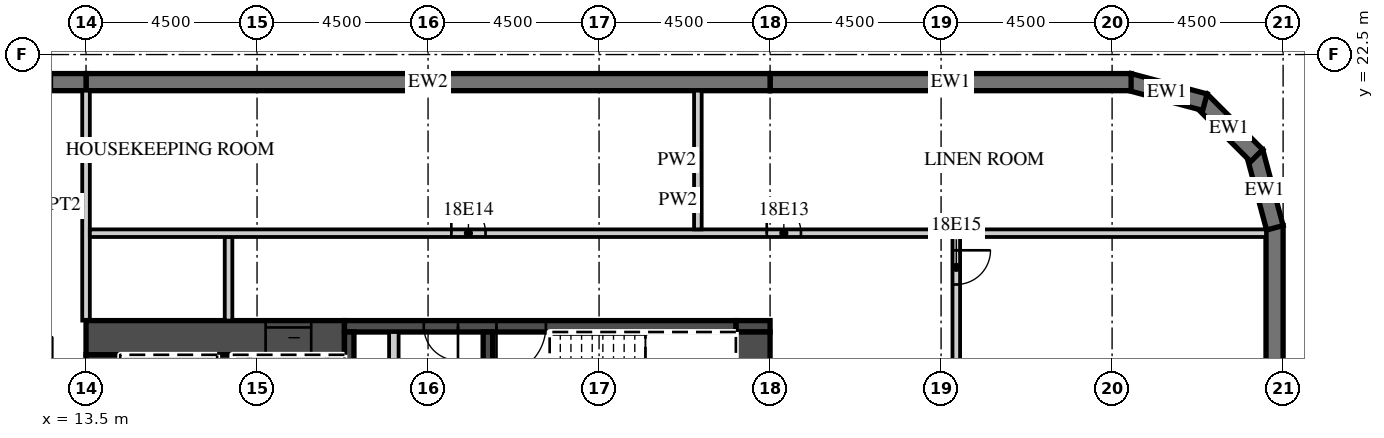
"""IFC4 building model, lengths in metres.
Left out: names, types, materials, properties, quantities, classifications, styles, units other than length and angle.
Written with IfcOpenShell. Run it as: python <this file> out.ifc"""

import sys

from ifc_helpers import new_model, si_unit, direction, frame, frame_2d, origin, place, context, subcontext, project, spatial, polyline, rectangle, outline, extrude, element, fill, save


model = new_model("IFC4")
c1 = context("Model", 3, precision=1e-05, world=origin(), true_north=direction((0.0, 1.0)))
c2 = subcontext(c1, "Body", "Model", "MODEL_VIEW")
j1 = project(units=[si_unit("LENGTHUNIT", "METRE"), si_unit("PLANEANGLEUNIT", "RADIAN")], contexts=[c1])
p1 = place(None, origin())
s1 = spatial("IfcSite", under=j1, at=p1, CompositionType="ELEMENT")
p2 = place(p1, origin())
s2 = spatial("IfcBuilding", under=s1, at=p2, CompositionType="ELEMENT")
p3 = place(p2, frame((0.0, 0.0, 89.7)))
s3 = spatial("IfcBuildingStorey", under=s2, at=p3, CompositionType="ELEMENT", Elevation=89.7)
p4 = place(p3, frame((44.775, -18.0, 0.0), z_axis=(0.0, 0.0, 1.0), x_axis=(0.0, 1.0, 0.0)))
e1 = element("IfcWall", 1, at=p4, inside=s3, PredefinedType="SOLIDWALL", context=c2, shape_type="SweptSolid", body=[
    extrude(rectangle(XDim=36.0, YDim=0.45, at=frame_2d((18.0, 0.0))), origin(), (0.0, 0.0, 1.0), 3.02),
])
p5 = place(p4, frame((3.9, 0.0, 0.45)))
e2 = element("IfcOpeningElement", 2, at=p5, cuts=e1, PredefinedType="OPENING", context=c2, shape_type="SweptSolid", body=[
    extrude(rectangle(XDim=3.3, YDim=2.25, at=frame_2d((1.65, 1.125))), frame((0.0, 0.235, 0.0), z_axis=(0.0, -1.0, 0.0), x_axis=(1.0, 0.0, 0.0)), (0.0, 0.0, 1.0), 0.47),
])
p6 = place(p4, frame((8.4, 0.0, 0.45)))
e3 = element("IfcOpeningElement", 3, at=p6, cuts=e1, PredefinedType="OPENING", context=c2, shape_type="SweptSolid", body=[
    extrude(rectangle(XDim=3.3, YDim=2.25, at=frame_2d((1.65, 1.125))), frame((0.0, 0.235, 0.0), z_axis=(0.0, -1.0, 0.0), x_axis=(1.0, 0.0, 0.0)), (0.0, 0.0, 1.0), 0.47),
])
p7 = place(p4, frame((12.9, 0.0, 0.45)))
e4 = element("IfcOpeningElement", 4, at=p7, cuts=e1, PredefinedType="OPENING", context=c2, shape_type="SweptSolid", body=[
    extrude(rectangle(XDim=3.3, YDim=2.25, at=frame_2d((1.65, 1.125))), frame((0.0, 0.235, 0.0), z_axis=(0.0, -1.0, 0.0), x_axis=(1.0, 0.0, 0.0)), (0.0, 0.0, 1.0), 0.47),
])
p8 = place(p3, frame((44.783, 17.942, 0.0), z_axis=(0.0, 0.0, 1.0), x_axis=(-0.25881466832, 0.965926999034, 0.0)))
e5 = element("IfcWall", 5, at=p8, inside=s3, PredefinedType="SOLIDWALL", context=c2, shape_type="SweptSolid", body=[
    extrude(outline(polyline([(0.0, -0.225), (2.071, -0.225), (1.95, 0.225), (0.121, 0.225), (0.0, -0.225)])), origin(), (0.0, 0.0, 1.0), 3.02),
])
p9 = place(p3, frame((44.305, 19.841, 0.0), z_axis=(0.0, 0.0, 1.0), x_axis=(-0.707106781187, 0.707106781187, 0.0)))
e6 = element("IfcWall", 6, at=p9, inside=s3, PredefinedType="SOLIDWALL", context=c2, shape_type="SweptSolid", body=[
    extrude(outline(polyline([(0.0, -0.225), (2.071, -0.225), (1.95, 0.225), (0.121, 0.225), (0.0, -0.225)])), origin(), (0.0, 0.0, 1.0), 3.02),
])
p10 = place(p3, frame((42.942, 21.247, 0.0), z_axis=(0.0, 0.0, 1.0), x_axis=(-0.965926999034, 0.25881466832, 0.0)))
e7 = element("IfcWall", 7, at=p10, inside=s3, PredefinedType="SOLIDWALL", context=c2, shape_type="SweptSolid", body=[
    extrude(outline(polyline([(-0.0, -0.225), (2.07, -0.225), (1.95, 0.225), (0.12, 0.225), (-0.0, -0.225)])), origin(), (0.0, 0.0, 1.0), 3.02),
])
p11 = place(p3, frame((41.0, 21.775, 0.0), z_axis=(0.0, 0.0, 1.0), x_axis=(-1.0, 0.0, 0.0)))
e8 = element("IfcWall", 8, at=p11, inside=s3, PredefinedType="SOLIDWALL", context=c2, shape_type="SweptSolid", body=[
    extrude(rectangle(XDim=9.5, YDim=0.45, at=frame_2d((4.75, 0.0))), origin(), (0.0, 0.0, 1.0), 3.02),
])
p12 = place(p3, frame((31.5, 21.775, 0.0), z_axis=(0.0, 0.0, 1.0), x_axis=(-1.0, 0.0, 0.0)))
e9 = element("IfcWall", 9, at=p12, inside=s3, PredefinedType="SOLIDWALL", context=c2, shape_type="SweptSolid", body=[
    extrude(rectangle(XDim=18.0, YDim=0.45, at=frame_2d((9.0, 0.0))), origin(), (0.0, 0.0, 1.0), 3.02),
])
p13 = place(p3, frame((13.5, 21.775, 0.0), z_axis=(0.0, 0.0, 1.0), x_axis=(-1.0, 0.0, 0.0)))
e10 = element("IfcWall", 10, at=p13, inside=s3, PredefinedType="SOLIDWALL", context=c2, shape_type="SweptSolid", body=[
    extrude(rectangle(XDim=54.5, YDim=0.45, at=frame_2d((27.25, 0.0))), origin(), (0.0, 0.0, 1.0), 3.02),
])
p14 = place(p13, frame((0.9, 0.0, 0.45)))
e11 = element("IfcOpeningElement", 11, at=p14, cuts=e10, PredefinedType="OPENING", context=c2, shape_type="SweptSolid", body=[
    extrude(rectangle(XDim=2.7, YDim=2.25, at=frame_2d((1.35, 1.125))), frame((0.0, 0.235, 0.0), z_axis=(0.0, -1.0, 0.0), x_axis=(1.0, 0.0, 0.0)), (0.0, 0.0, 1.0), 0.47),
])
p15 = place(p13, frame((5.4, 0.0, 0.45)))
e12 = element("IfcOpeningElement", 12, at=p15, cuts=e10, PredefinedType="OPENING", context=c2, shape_type="SweptSolid", body=[
    extrude(rectangle(XDim=2.7, YDim=2.25, at=frame_2d((1.35, 1.125))), frame((0.0, 0.235, 0.0), z_axis=(0.0, -1.0, 0.0), x_axis=(1.0, 0.0, 0.0)), (0.0, 0.0, 1.0), 0.47),
])
p16 = place(p13, frame((9.9, 0.0, 0.45)))
e13 = element("IfcOpeningElement", 13, at=p16, cuts=e10, PredefinedType="OPENING", context=c2, shape_type="SweptSolid", body=[
    extrude(rectangle(XDim=2.7, YDim=2.25, at=frame_2d((1.35, 1.125))), frame((0.0, 0.235, 0.0), z_axis=(0.0, -1.0, 0.0), x_axis=(1.0, 0.0, 0.0)), (0.0, 0.0, 1.0), 0.47),
])
p17 = place(p13, frame((14.4, 0.0, 0.45)))
e14 = element("IfcOpeningElement", 14, at=p17, cuts=e10, PredefinedType="OPENING", context=c2, shape_type="SweptSolid", body=[
    extrude(rectangle(XDim=2.7, YDim=2.25, at=frame_2d((1.35, 1.125))), frame((0.0, 0.235, 0.0), z_axis=(0.0, -1.0, 0.0), x_axis=(1.0, 0.0, 0.0)), (0.0, 0.0, 1.0), 0.47),
])
p18 = place(p13, frame((18.9, 0.0, 0.45)))
e15 = element("IfcOpeningElement", 15, at=p18, cuts=e10, PredefinedType="OPENING", context=c2, shape_type="SweptSolid", body=[
    extrude(rectangle(XDim=2.7, YDim=2.25, at=frame_2d((1.35, 1.125))), frame((0.0, 0.235, 0.0), z_axis=(0.0, -1.0, 0.0), x_axis=(1.0, 0.0, 0.0)), (0.0, 0.0, 1.0), 0.47),
])
p19 = place(p13, frame((23.4, 0.0, 0.45)))
e16 = element("IfcOpeningElement", 16, at=p19, cuts=e10, PredefinedType="OPENING", context=c2, shape_type="SweptSolid", body=[
    extrude(rectangle(XDim=2.7, YDim=2.25, at=frame_2d((1.35, 1.125))), frame((0.0, 0.235, 0.0), z_axis=(0.0, -1.0, 0.0), x_axis=(1.0, 0.0, 0.0)), (0.0, 0.0, 1.0), 0.47),
])
p20 = place(p13, frame((27.9, 0.0, 0.45)))
e17 = element("IfcOpeningElement", 17, at=p20, cuts=e10, PredefinedType="OPENING", context=c2, shape_type="SweptSolid", body=[
    extrude(rectangle(XDim=2.7, YDim=2.25, at=frame_2d((1.35, 1.125))), frame((0.0, 0.235, 0.0), z_axis=(0.0, -1.0, 0.0), x_axis=(1.0, 0.0, 0.0)), (0.0, 0.0, 1.0), 0.47),
])
p21 = place(p13, frame((32.4, 0.0, 0.45)))
e18 = element("IfcOpeningElement", 18, at=p21, cuts=e10, PredefinedType="OPENING", context=c2, shape_type="SweptSolid", body=[
    extrude(rectangle(XDim=2.7, YDim=2.25, at=frame_2d((1.35, 1.125))), frame((0.0, 0.235, 0.0), z_axis=(0.0, -1.0, 0.0), x_axis=(1.0, 0.0, 0.0)), (0.0, 0.0, 1.0), 0.47),
])
p22 = place(p13, frame((36.9, 0.0, 0.45)))
e19 = element("IfcOpeningElement", 19, at=p22, cuts=e10, PredefinedType="OPENING", context=c2, shape_type="SweptSolid", body=[
    extrude(rectangle(XDim=2.7, YDim=2.25, at=frame_2d((1.35, 1.125))), frame((0.0, 0.235, 0.0), z_axis=(0.0, -1.0, 0.0), x_axis=(1.0, 0.0, 0.0)), (0.0, 0.0, 1.0), 0.47),
])
p23 = place(p13, frame((41.4, 0.0, 0.45)))
e20 = element("IfcOpeningElement", 20, at=p23, cuts=e10, PredefinedType="OPENING", context=c2, shape_type="SweptSolid", body=[
    extrude(rectangle(XDim=2.7, YDim=2.25, at=frame_2d((1.35, 1.125))), frame((0.0, 0.235, 0.0), z_axis=(0.0, -1.0, 0.0), x_axis=(1.0, 0.0, 0.0)), (0.0, 0.0, 1.0), 0.47),
])
p24 = place(p13, frame((45.9, 0.0, 0.45)))
e21 = element("IfcOpeningElement", 21, at=p24, cuts=e10, PredefinedType="OPENING", context=c2, shape_type="SweptSolid", body=[
    extrude(rectangle(XDim=2.7, YDim=2.25, at=frame_2d((1.35, 1.125))), frame((0.0, 0.235, 0.0), z_axis=(0.0, -1.0, 0.0), x_axis=(1.0, 0.0, 0.0)), (0.0, 0.0, 1.0), 0.47),
])
p25 = place(p13, frame((50.4, 0.0, 0.45)))
e22 = element("IfcOpeningElement", 22, at=p25, cuts=e10, PredefinedType="OPENING", context=c2, shape_type="SweptSolid", body=[
    extrude(rectangle(XDim=2.7, YDim=2.25, at=frame_2d((1.35, 1.125))), frame((0.0, 0.235, 0.0), z_axis=(0.0, -1.0, 0.0), x_axis=(1.0, 0.0, 0.0)), (0.0, 0.0, 1.0), 0.47),
])
p26 = place(p3, frame((13.5, 15.5, 0.0), z_axis=(0.0, 0.0, 1.0), x_axis=(0.0, 1.0, 0.0)))
e23 = element("IfcWall", 23, at=p26, inside=s3, PredefinedType="PARTITIONING", context=c2, shape_type="SweptSolid", body=[
    extrude(rectangle(XDim=6.05, YDim=0.2, at=frame_2d((3.025, 0.0))), origin(), (0.0, 0.0, 1.0), 3.02),
])
p27 = place(p3, frame((13.5, 15.05, 0.0), z_axis=(0.0, 0.0, 1.0), x_axis=(1.0, 0.0, 0.0)))
e24 = element("IfcWall", 24, at=p27, inside=s3, PredefinedType="SHEAR", context=c2, shape_type="SweptSolid", body=[
    extrude(rectangle(XDim=6.8, YDim=0.9, at=frame_2d((3.4, 0.0))), origin(), (0.0, 0.0, 1.0), 3.02),
])
p28 = place(p27, frame((4.725, 0.0, 0.0)))
e25 = element("IfcOpeningElement", 25, at=p28, cuts=e24, PredefinedType="OPENING", context=c2, shape_type="SweptSolid", body=[
    extrude(rectangle(XDim=1.2, YDim=2.1, at=frame_2d((0.6, 1.05))), frame((0.0, 0.46, 0.0), z_axis=(0.0, -1.0, 0.0), x_axis=(1.0, 0.0, 0.0)), (0.0, 0.0, 1.0), 0.92),
])
p29 = place(p3, frame((30.6, 15.35, 0.0), z_axis=(0.0, 0.0, 1.0), x_axis=(1.0, 0.0, 0.0)))
e26 = element("IfcWall", 26, at=p29, inside=s3, PredefinedType="SHEAR", context=c2, shape_type="SweptSolid", body=[
    extrude(rectangle(XDim=0.9, YDim=0.3, at=frame_2d((0.45, 0.0))), origin(), (0.0, 0.0, 1.0), 3.02),
])
p30 = place(p3, frame((20.3, 15.35, 0.0), z_axis=(0.0, 0.0, 1.0), x_axis=(1.0, 0.0, 0.0)))
e27 = element("IfcWall", 27, at=p30, inside=s3, PredefinedType="SHEAR", context=c2, shape_type="SweptSolid", body=[
    extrude(rectangle(XDim=10.3, YDim=0.3, at=frame_2d((5.15, 0.0))), origin(), (0.0, 0.0, 1.0), 3.02),
])
p31 = place(p30, frame((4.0, 0.0, 0.0)))
e28 = element("IfcOpeningElement", 28, at=p31, cuts=e27, PredefinedType="OPENING", context=c2, shape_type="SweptSolid", body=[
    extrude(rectangle(XDim=1.3, YDim=2.1, at=frame_2d((0.65, 1.05))), frame((0.0, 0.16, 0.0), z_axis=(0.0, -1.0, 0.0), x_axis=(1.0, 0.0, 0.0)), (0.0, 0.0, 1.0), 0.32),
])
p32 = place(p30, frame((2.087, 0.0, 0.0)))
e29 = element("IfcOpeningElement", 29, at=p32, cuts=e27, PredefinedType="OPENING", context=c2, shape_type="SweptSolid", body=[
    extrude(rectangle(XDim=0.9, YDim=2.1, at=frame_2d((0.45, 1.05))), frame((0.0, 0.16, 0.0), z_axis=(0.0, -1.0, 0.0), x_axis=(1.0, 0.0, 0.0)), (0.0, 0.0, 1.0), 0.32),
])
p33 = place(p3, frame((31.05, 2.4, 0.0), z_axis=(0.0, 0.0, 1.0), x_axis=(0.0, 1.0, 0.0)))
e30 = element("IfcWall", 30, at=p33, inside=s3, PredefinedType="SHEAR", context=c2, shape_type="SweptSolid", body=[
    extrude(rectangle(XDim=12.8, YDim=0.9, at=frame_2d((6.4, 0.0))), origin(), (0.0, 0.0, 1.0), 3.02),
])
p34 = place(p33, frame((0.2, 0.0, 0.0)))
e31 = element("IfcOpeningElement", 31, at=p34, cuts=e30, PredefinedType="OPENING", context=c2, shape_type="SweptSolid", body=[
    extrude(rectangle(XDim=1.1, YDim=2.1, at=frame_2d((0.55, 1.05))), frame((0.0, 0.46, 0.0), z_axis=(0.0, -1.0, 0.0), x_axis=(1.0, 0.0, 0.0)), (0.0, 0.0, 1.0), 0.92),
])
p35 = place(p3, frame((13.95, 2.4, 0.0), z_axis=(0.0, 0.0, 1.0), x_axis=(0.0, 1.0, 0.0)))
e32 = element("IfcWall", 32, at=p35, inside=s3, PredefinedType="SHEAR", context=c2, shape_type="SweptSolid", body=[
    extrude(rectangle(XDim=12.2, YDim=0.9, at=frame_2d((6.1, 0.0))), origin(), (0.0, 0.0, 1.0), 3.02),
])
p36 = place(p3, frame((17.15, 8.8, 0.0), z_axis=(0.0, 0.0, 1.0), x_axis=(0.0, 1.0, 0.0)))
e33 = element("IfcWall", 33, at=p36, inside=s3, PredefinedType="SHEAR", context=c2, shape_type="SweptSolid", body=[
    extrude(rectangle(XDim=5.8, YDim=0.4, at=frame_2d((2.9, 0.0))), origin(), (0.0, 0.0, 1.0), 3.02),
])
for number, where, z_axis, x_axis in (
    (34, (20.425, 11.95, 0.0), (0.0, 0.0, 1.0), (0.0, 1.0, 0.0)),
    (35, (24.075, 11.95, 0.0), (0.0, 0.0, 1.0), (0.0, 1.0, 0.0)),
):
    element("IfcWall", number, at=place(p3, frame(where, z_axis=z_axis, x_axis=x_axis)), inside=s3, PredefinedType="SHEAR", context=c2, shape_type="SweptSolid", body=[
        extrude(rectangle(XDim=3.25, YDim=0.25, at=frame_2d((1.625, 0.0))), origin(), (0.0, 0.0, 1.0), 3.02),
    ])
p37 = place(p3, frame((21.6, 11.95, 0.0), z_axis=(0.0, 0.0, 1.0), x_axis=(0.0, 1.0, 0.0)))
e36 = element("IfcWall", 36, at=p37, inside=s3, PredefinedType="PARTITIONING", context=c2, shape_type="SweptSolid", body=[
    extrude(rectangle(XDim=3.25, YDim=0.25, at=frame_2d((1.625, 0.0))), origin(), (0.0, 0.0, 1.0), 3.02),
])
p38 = place(p3, frame((17.25, 15.5, 0.0), z_axis=(0.0, 0.0, 1.0), x_axis=(0.0, 1.0, 0.0)))
e37 = element("IfcWall", 37, at=p38, inside=s3, PredefinedType="PARTITIONING", context=c2, shape_type="SweptSolid", body=[
    extrude(rectangle(XDim=2.2, YDim=0.2, at=frame_2d((1.1, 0.0))), origin(), (0.0, 0.0, 1.0), 3.02),
])
p39 = place(p3, frame((36.4, 1.75, 0.0), z_axis=(0.0, 0.0, 1.0), x_axis=(0.0, 1.0, 0.0)))
e38 = element("IfcWall", 38, at=p39, inside=s3, PredefinedType="PARTITIONING", context=c2, shape_type="SweptSolid", body=[
    extrude(rectangle(XDim=15.95, YDim=0.2, at=frame_2d((7.975, 0.0))), origin(), (0.0, 0.0, 1.0), 3.02),
])
p40 = place(p39, frame((14.7, 0.0, 0.0)))
e39 = element("IfcOpeningElement", 39, at=p40, cuts=e38, PredefinedType="OPENING", context=c2, shape_type="SweptSolid", body=[
    extrude(rectangle(XDim=0.9, YDim=2.1, at=frame_2d((0.45, 1.05))), frame((0.0, 0.11, 0.0), z_axis=(0.0, -1.0, 0.0), x_axis=(1.0, 0.0, 0.0)), (0.0, 0.0, 1.0), 0.22),
])
p41 = place(p3, frame((13.6, 17.8, 0.0), z_axis=(0.0, 0.0, 1.0), x_axis=(1.0, 0.0, 0.0)))
e40 = element("IfcWall", 40, at=p41, inside=s3, PredefinedType="PARTITIONING", context=c2, shape_type="SweptSolid", body=[
    extrude(rectangle(XDim=30.95, YDim=0.2, at=frame_2d((15.475, 0.0))), origin(), (0.0, 0.0, 1.0), 3.02),
])
p42 = place(p41, frame((17.812, 0.0, 0.0)))
e41 = element("IfcOpeningElement", 41, at=p42, cuts=e40, PredefinedType="OPENING", context=c2, shape_type="SweptSolid", body=[
    extrude(rectangle(XDim=0.9, YDim=2.1, at=frame_2d((0.45, 1.05))), frame((0.0, 0.11, 0.0), z_axis=(0.0, -1.0, 0.0), x_axis=(1.0, 0.0, 0.0)), (0.0, 0.0, 1.0), 0.22),
])
p43 = place(p41, frame((9.512, 0.0, 0.0)))
e42 = element("IfcOpeningElement", 42, at=p43, cuts=e40, PredefinedType="OPENING", context=c2, shape_type="SweptSolid", body=[
    extrude(rectangle(XDim=0.9, YDim=2.1, at=frame_2d((0.45, 1.05))), frame((0.0, 0.11, 0.0), z_axis=(0.0, -1.0, 0.0), x_axis=(1.0, 0.0, 0.0)), (0.0, 0.0, 1.0), 0.22),
])
p44 = place(p3, frame((29.6, 17.9, 0.0), z_axis=(0.0, 0.0, 1.0), x_axis=(0.0, 1.0, 0.0)))
e43 = element("IfcWall", 43, at=p44, inside=s3, PredefinedType="PARTITIONING", context=c2, shape_type="SweptSolid", body=[
    extrude(rectangle(XDim=3.65, YDim=0.2, at=frame_2d((1.825, 0.0))), origin(), (0.0, 0.0, 1.0), 3.02),
])
p45 = place(p28, origin())
e44 = element("IfcDoor", 44, at=p45, inside=s3, OperationType="SLIDING_TO_LEFT", PredefinedType="DOOR", context=c2, shape_type="SweptSolid", body=[
    extrude(rectangle(XDim=1.2, YDim=2.1, at=frame_2d((0.6, 1.05))), frame((0.0, 0.025, 0.0), z_axis=(0.0, -1.0, 0.0), x_axis=(1.0, 0.0, 0.0)), (0.0, 0.0, 1.0), 0.05),
])
fill(e25, e44)
p46 = place(p31, origin())
e45 = element("IfcDoor", 45, at=p46, inside=s3, OperationType="SINGLE_SWING_LEFT", PredefinedType="DOOR", context=c2, shape_type="SweptSolid", body=[
    extrude(rectangle(XDim=1.3, YDim=2.1, at=frame_2d((0.65, 1.05))), frame((0.0, 0.025, 0.0), z_axis=(0.0, -1.0, 0.0), x_axis=(1.0, 0.0, 0.0)), (0.0, 0.0, 1.0), 0.05),
])
fill(e28, e45)
p47 = place(p32, origin())
e46 = element("IfcDoor", 46, at=p47, inside=s3, OperationType="SINGLE_SWING_RIGHT", PredefinedType="DOOR", context=c2, shape_type="SweptSolid", body=[
    extrude(rectangle(XDim=0.9, YDim=2.1, at=frame_2d((0.45, 1.05))), frame((0.0, 0.025, 0.0), z_axis=(0.0, -1.0, 0.0), x_axis=(1.0, 0.0, 0.0)), (0.0, 0.0, 1.0), 0.05),
])
fill(e29, e46)
p48 = place(p42, origin())
e47 = element("IfcDoor", 47, at=p48, inside=s3, OperationType="SINGLE_SWING_LEFT", PredefinedType="DOOR", context=c2, shape_type="SweptSolid", body=[
    extrude(rectangle(XDim=0.9, YDim=2.1, at=frame_2d((0.45, 1.05))), frame((0.0, 0.025, 0.0), z_axis=(0.0, -1.0, 0.0), x_axis=(1.0, 0.0, 0.0)), (0.0, 0.0, 1.0), 0.05),
])
fill(e41, e47)
p49 = place(p43, origin())
e48 = element("IfcDoor", 48, at=p49, inside=s3, OperationType="SINGLE_SWING_LEFT", PredefinedType="DOOR", context=c2, shape_type="SweptSolid", body=[
    extrude(rectangle(XDim=0.9, YDim=2.1, at=frame_2d((0.45, 1.05))), frame((0.0, 0.025, 0.0), z_axis=(0.0, -1.0, 0.0), x_axis=(1.0, 0.0, 0.0)), (0.0, 0.0, 1.0), 0.05),
])
fill(e42, e48)
p50 = place(p40, origin())
e49 = element("IfcDoor", 49, at=p50, inside=s3, OperationType="SINGLE_SWING_RIGHT", PredefinedType="DOOR", context=c2, shape_type="SweptSolid", body=[
    extrude(rectangle(XDim=0.9, YDim=2.1, at=frame_2d((0.45, 1.05))), frame((0.0, 0.025, 0.0), z_axis=(0.0, -1.0, 0.0), x_axis=(1.0, 0.0, 0.0)), (0.0, 0.0, 1.0), 0.05),
])
fill(e39, e49)
save(model, sys.argv[1])
